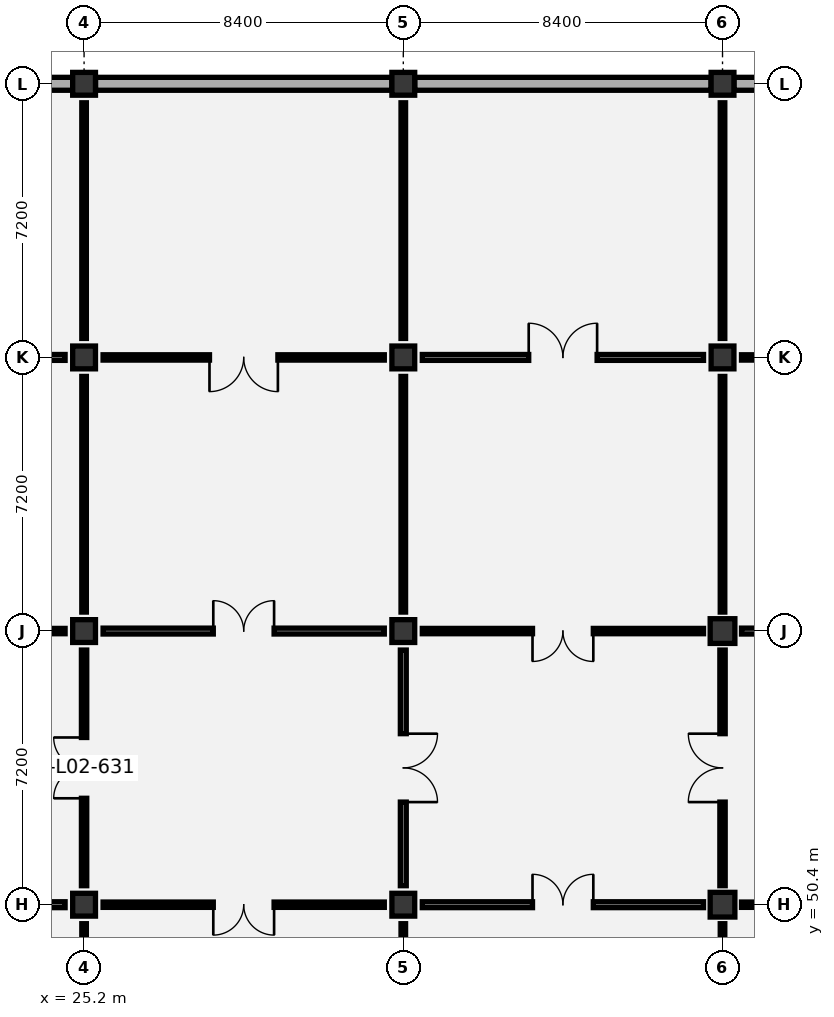
"""IFC4 building model, lengths in metres.
Left out: names, types, materials, properties, quantities, classifications, styles, units other than length and angle.
Written with IfcOpenShell. Run it as: python <this file> out.ifc"""

import sys

from ifc_helpers import new_model, si_unit, direction, frame, frame_2d, origin, origin_2d, place, context, subcontext, project, spatial, rectangle, extrude, element, fill, save


model = new_model("IFC4")
c1 = context("Model", 3, precision=1e-05, world=origin(), true_north=direction((0.0, 1.0)))
c2 = subcontext(c1, "Body", "Model", "MODEL_VIEW")
j1 = project(units=[si_unit("LENGTHUNIT", "METRE"), si_unit("PLANEANGLEUNIT", "RADIAN")], contexts=[c1])
p1 = place(None, origin())
s1 = spatial("IfcSite", under=j1, at=p1, CompositionType="ELEMENT")
p2 = place(p1, origin())
s2 = spatial("IfcBuilding", under=s1, at=p2, CompositionType="ELEMENT")
p3 = place(p2, frame((0.0, 0.0, 11.4)))
s3 = spatial("IfcBuildingStorey", under=s2, at=p3, CompositionType="ELEMENT", Elevation=11.4)
for number, where, z_axis, x_axis in (
    (1, (25.2, 50.4, 0.0), (0.0, 0.0, 1.0), (1.0, 0.0, 0.0)),
    (2, (25.2, 57.6, 0.0), (0.0, 0.0, 1.0), (1.0, 0.0, 0.0)),
    (3, (25.2, 64.8, 0.0), (0.0, 0.0, 1.0), (1.0, 0.0, 0.0)),
    (4, (25.2, 72.0, 0.0), (0.0, 0.0, 1.0), (1.0, 0.0, 0.0)),
    (5, (33.6, 50.4, 0.0), (0.0, 0.0, 1.0), (1.0, 0.0, 0.0)),
    (6, (33.6, 57.6, 0.0), (0.0, 0.0, 1.0), (1.0, 0.0, 0.0)),
    (7, (33.6, 64.8, 0.0), (0.0, 0.0, 1.0), (1.0, 0.0, 0.0)),
    (8, (33.6, 72.0, 0.0), (0.0, 0.0, 1.0), (1.0, 0.0, 0.0)),
):
    element("IfcColumn", number, at=place(p3, frame(where, z_axis=z_axis, x_axis=x_axis)), inside=s3, PredefinedType="COLUMN", context=c2, shape_type="SweptSolid", body=[
        extrude(rectangle(XDim=0.6, YDim=0.6, at=origin_2d()), origin(), (0.0, 0.0, 1.0), 5.4),
    ])
for number, where, z_axis, x_axis in (
    (9, (42.0, 50.4, 0.0), (0.0, 0.0, 1.0), (1.0, 0.0, 0.0)),
    (10, (42.0, 57.6, 0.0), (0.0, 0.0, 1.0), (1.0, 0.0, 0.0)),
):
    element("IfcColumn", number, at=place(p3, frame(where, z_axis=z_axis, x_axis=x_axis)), inside=s3, PredefinedType="COLUMN", context=c2, shape_type="SweptSolid", body=[
        extrude(rectangle(XDim=0.65, YDim=0.65, at=origin_2d()), origin(), (0.0, 0.0, 1.0), 5.4),
    ])
for number, where, z_axis, x_axis in (
    (11, (42.0, 64.8, 0.0), (0.0, 0.0, 1.0), (1.0, 0.0, 0.0)),
    (12, (42.0, 72.0, 0.0), (0.0, 0.0, 1.0), (1.0, 0.0, 0.0)),
):
    element("IfcColumn", number, at=place(p3, frame(where, z_axis=z_axis, x_axis=x_axis)), inside=s3, PredefinedType="COLUMN", context=c2, shape_type="SweptSolid", body=[
        extrude(rectangle(XDim=0.6, YDim=0.6, at=origin_2d()), origin(), (0.0, 0.0, 1.0), 5.4),
    ])
p4 = place(p3, frame((17.1, 72.0, 0.0), z_axis=(0.0, 0.0, 1.0), x_axis=(1.0, 0.0, 0.0)))
e13 = element("IfcWall", 13, at=p4, inside=s3, PredefinedType="SOLIDWALL", context=c2, shape_type="SweptSolid", body=[
    extrude(rectangle(XDim=7.8, YDim=0.34, at=frame_2d((3.9, 0.0))), origin(), (0.0, 0.0, 1.0), 4.445),
])
for number, where, z_axis, x_axis in (
    (14, (25.5, 72.0, 0.0), (0.0, 0.0, 1.0), (1.0, 0.0, 0.0)),
    (15, (33.9, 72.0, 0.0), (0.0, 0.0, 1.0), (1.0, 0.0, 0.0)),
    (16, (42.3, 72.0, 0.0), (0.0, 0.0, 1.0), (1.0, 0.0, 0.0)),
):
    element("IfcWall", number, at=place(p3, frame(where, z_axis=z_axis, x_axis=x_axis)), inside=s3, PredefinedType="SOLIDWALL", context=c2, shape_type="SweptSolid", body=[
        extrude(rectangle(XDim=7.8, YDim=0.34, at=frame_2d((3.9, 0.0))), origin(), (0.0, 0.0, 1.0), 4.445),
    ])
p5 = place(p3, frame((25.2, 43.7, 0.0), z_axis=(0.0, 0.0, 1.0), x_axis=(0.0, 1.0, 0.0)))
e17 = element("IfcWall", 17, at=p5, inside=s3, PredefinedType="PARTITIONING", context=c2, shape_type="SweptSolid", body=[
    extrude(rectangle(XDim=6.2, YDim=0.12, at=frame_2d((3.1, 0.0))), origin(), (0.0, 0.0, 1.0), 5.175),
])
p6 = place(p3, frame((17.3, 50.4, 0.0), z_axis=(0.0, 0.0, 1.0), x_axis=(1.0, 0.0, 0.0)))
e18 = element("IfcWall", 18, at=p6, inside=s3, PredefinedType="PARTITIONING", context=c2, shape_type="SweptSolid", body=[
    extrude(rectangle(XDim=7.4, YDim=0.155, at=frame_2d((3.7, 0.0))), origin(), (0.0, 0.0, 1.0), 5.175),
])
p7 = place(p6, frame((2.8, 0.0, 0.0)))
e19 = element("IfcOpeningElement", 19, at=p7, cuts=e18, PredefinedType="OPENING", context=c2, shape_type="SweptSolid", body=[
    extrude(rectangle(XDim=1.8, YDim=2.25, at=frame_2d((0.9, 1.125))), frame((0.0, 0.087, 0.0), z_axis=(0.0, -1.0, 0.0), x_axis=(1.0, 0.0, 0.0)), (0.0, 0.0, 1.0), 0.175),
])
p8 = place(p3, frame((25.2, 50.9, 0.0), z_axis=(0.0, 0.0, 1.0), x_axis=(0.0, 1.0, 0.0)))
e20 = element("IfcWall", 20, at=p8, inside=s3, PredefinedType="PARTITIONING", context=c2, shape_type="SweptSolid", body=[
    extrude(rectangle(XDim=6.2, YDim=0.14, at=frame_2d((3.1, 0.0))), origin(), (0.0, 0.0, 1.0), 5.175),
])
p9 = place(p8, frame((2.3, 0.0, 0.0)))
e21 = element("IfcOpeningElement", 21, at=p9, cuts=e20, PredefinedType="OPENING", context=c2, shape_type="SweptSolid", body=[
    extrude(rectangle(XDim=1.6, YDim=2.2, at=frame_2d((0.8, 1.1))), frame((0.0, 0.08, 0.0), z_axis=(0.0, -1.0, 0.0), x_axis=(1.0, 0.0, 0.0)), (0.0, 0.0, 1.0), 0.16),
])
p10 = place(p3, frame((17.3, 57.6, 0.0), z_axis=(0.0, 0.0, 1.0), x_axis=(1.0, 0.0, 0.0)))
e22 = element("IfcWall", 22, at=p10, inside=s3, PredefinedType="PARTITIONING", context=c2, shape_type="SweptSolid", body=[
    extrude(rectangle(XDim=7.4, YDim=0.14, at=frame_2d((3.7, 0.0))), origin(), (0.0, 0.0, 1.0), 4.445),
])
p11 = place(p10, frame((2.8, 0.0, 0.0)))
e23 = element("IfcOpeningElement", 23, at=p11, cuts=e22, PredefinedType="OPENING", context=c2, shape_type="SweptSolid", body=[
    extrude(rectangle(XDim=1.8, YDim=2.25, at=frame_2d((0.9, 1.125))), frame((0.0, 0.08, 0.0), z_axis=(0.0, -1.0, 0.0), x_axis=(1.0, 0.0, 0.0)), (0.0, 0.0, 1.0), 0.16),
])
p12 = place(p3, frame((25.2, 58.1, 0.0), z_axis=(0.0, 0.0, 1.0), x_axis=(0.0, 1.0, 0.0)))
e24 = element("IfcWall", 24, at=p12, inside=s3, PredefinedType="PARTITIONING", context=c2, shape_type="SweptSolid", body=[
    extrude(rectangle(XDim=6.2, YDim=0.12, at=frame_2d((3.1, 0.0))), origin(), (0.0, 0.0, 1.0), 4.395),
])
p13 = place(p3, frame((17.3, 64.8, 0.0), z_axis=(0.0, 0.0, 1.0), x_axis=(1.0, 0.0, 0.0)))
e25 = element("IfcWall", 25, at=p13, inside=s3, PredefinedType="PARTITIONING", context=c2, shape_type="SweptSolid", body=[
    extrude(rectangle(XDim=7.4, YDim=0.155, at=frame_2d((3.7, 0.0))), origin(), (0.0, 0.0, 1.0), 4.345),
])
p14 = place(p13, frame((2.9, 0.0, 0.0)))
e26 = element("IfcOpeningElement", 26, at=p14, cuts=e25, PredefinedType="OPENING", context=c2, shape_type="SweptSolid", body=[
    extrude(rectangle(XDim=1.6, YDim=2.2, at=frame_2d((0.8, 1.1))), frame((0.0, 0.087, 0.0), z_axis=(0.0, -1.0, 0.0), x_axis=(1.0, 0.0, 0.0)), (0.0, 0.0, 1.0), 0.175),
])
p15 = place(p3, frame((25.2, 65.3, 0.0), z_axis=(0.0, 0.0, 1.0), x_axis=(0.0, 1.0, 0.0)))
e27 = element("IfcWall", 27, at=p15, inside=s3, PredefinedType="PARTITIONING", context=c2, shape_type="SweptSolid", body=[
    extrude(rectangle(XDim=6.2, YDim=0.12, at=frame_2d((3.1, 0.0))), origin(), (0.0, 0.0, 1.0), 4.805),
])
p16 = place(p3, frame((33.6, 43.7, 0.0), z_axis=(0.0, 0.0, 1.0), x_axis=(0.0, 1.0, 0.0)))
e28 = element("IfcWall", 28, at=p16, inside=s3, PredefinedType="PARTITIONING", context=c2, shape_type="SweptSolid", body=[
    extrude(rectangle(XDim=6.2, YDim=0.12, at=frame_2d((3.1, 0.0))), origin(), (0.0, 0.0, 1.0), 5.175),
])
p17 = place(p3, frame((25.7, 50.4, 0.0), z_axis=(0.0, 0.0, 1.0), x_axis=(1.0, 0.0, 0.0)))
e29 = element("IfcWall", 29, at=p17, inside=s3, PredefinedType="PARTITIONING", context=c2, shape_type="SweptSolid", body=[
    extrude(rectangle(XDim=7.4, YDim=0.14, at=frame_2d((3.7, 0.0))), origin(), (0.0, 0.0, 1.0), 5.175),
])
p18 = place(p17, frame((2.9, 0.0, 0.0)))
e30 = element("IfcOpeningElement", 30, at=p18, cuts=e29, PredefinedType="OPENING", context=c2, shape_type="SweptSolid", body=[
    extrude(rectangle(XDim=1.6, YDim=2.2, at=frame_2d((0.8, 1.1))), frame((0.0, 0.08, 0.0), z_axis=(0.0, -1.0, 0.0), x_axis=(1.0, 0.0, 0.0)), (0.0, 0.0, 1.0), 0.16),
])
p19 = place(p3, frame((33.6, 50.9, 0.0), z_axis=(0.0, 0.0, 1.0), x_axis=(0.0, 1.0, 0.0)))
e31 = element("IfcWall", 31, at=p19, inside=s3, PredefinedType="PARTITIONING", context=c2, shape_type="SweptSolid", body=[
    extrude(rectangle(XDim=6.2, YDim=0.155, at=frame_2d((3.1, 0.0))), origin(), (0.0, 0.0, 1.0), 5.175),
])
p20 = place(p19, frame((2.2, 0.0, 0.0)))
e32 = element("IfcOpeningElement", 32, at=p20, cuts=e31, PredefinedType="OPENING", context=c2, shape_type="SweptSolid", body=[
    extrude(rectangle(XDim=1.8, YDim=2.25, at=frame_2d((0.9, 1.125))), frame((0.0, 0.087, 0.0), z_axis=(0.0, -1.0, 0.0), x_axis=(1.0, 0.0, 0.0)), (0.0, 0.0, 1.0), 0.175),
])
p21 = place(p3, frame((25.7, 57.6, 0.0), z_axis=(0.0, 0.0, 1.0), x_axis=(1.0, 0.0, 0.0)))
e33 = element("IfcWall", 33, at=p21, inside=s3, PredefinedType="PARTITIONING", context=c2, shape_type="SweptSolid", body=[
    extrude(rectangle(XDim=7.4, YDim=0.155, at=frame_2d((3.7, 0.0))), origin(), (0.0, 0.0, 1.0), 4.445),
])
p22 = place(p21, frame((2.9, 0.0, 0.0)))
e34 = element("IfcOpeningElement", 34, at=p22, cuts=e33, PredefinedType="OPENING", context=c2, shape_type="SweptSolid", body=[
    extrude(rectangle(XDim=1.6, YDim=2.2, at=frame_2d((0.8, 1.1))), frame((0.0, 0.087, 0.0), z_axis=(0.0, -1.0, 0.0), x_axis=(1.0, 0.0, 0.0)), (0.0, 0.0, 1.0), 0.175),
])
p23 = place(p3, frame((33.6, 58.1, 0.0), z_axis=(0.0, 0.0, 1.0), x_axis=(0.0, 1.0, 0.0)))
e35 = element("IfcWall", 35, at=p23, inside=s3, PredefinedType="PARTITIONING", context=c2, shape_type="SweptSolid", body=[
    extrude(rectangle(XDim=6.2, YDim=0.12, at=frame_2d((3.1, 0.0))), origin(), (0.0, 0.0, 1.0), 4.805),
])
p24 = place(p3, frame((25.7, 64.8, 0.0), z_axis=(0.0, 0.0, 1.0), x_axis=(1.0, 0.0, 0.0)))
e36 = element("IfcWall", 36, at=p24, inside=s3, PredefinedType="PARTITIONING", context=c2, shape_type="SweptSolid", body=[
    extrude(rectangle(XDim=7.4, YDim=0.14, at=frame_2d((3.7, 0.0))), origin(), (0.0, 0.0, 1.0), 4.345),
])
p25 = place(p24, frame((2.8, 0.0, 0.0)))
e37 = element("IfcOpeningElement", 37, at=p25, cuts=e36, PredefinedType="OPENING", context=c2, shape_type="SweptSolid", body=[
    extrude(rectangle(XDim=1.8, YDim=2.25, at=frame_2d((0.9, 1.125))), frame((0.0, 0.08, 0.0), z_axis=(0.0, -1.0, 0.0), x_axis=(1.0, 0.0, 0.0)), (0.0, 0.0, 1.0), 0.16),
])
p26 = place(p3, frame((33.6, 65.3, 0.0), z_axis=(0.0, 0.0, 1.0), x_axis=(0.0, 1.0, 0.0)))
e38 = element("IfcWall", 38, at=p26, inside=s3, PredefinedType="PARTITIONING", context=c2, shape_type="SweptSolid", body=[
    extrude(rectangle(XDim=6.2, YDim=0.12, at=frame_2d((3.1, 0.0))), origin(), (0.0, 0.0, 1.0), 4.395),
])
p27 = place(p3, frame((42.0, 43.7, 0.0), z_axis=(0.0, 0.0, 1.0), x_axis=(0.0, 1.0, 0.0)))
e39 = element("IfcWall", 39, at=p27, inside=s3, PredefinedType="PARTITIONING", context=c2, shape_type="SweptSolid", body=[
    extrude(rectangle(XDim=6.2, YDim=0.12, at=frame_2d((3.1, 0.0))), origin(), (0.0, 0.0, 1.0), 4.445),
])
p28 = place(p3, frame((34.1, 50.4, 0.0), z_axis=(0.0, 0.0, 1.0), x_axis=(1.0, 0.0, 0.0)))
e40 = element("IfcWall", 40, at=p28, inside=s3, PredefinedType="PARTITIONING", context=c2, shape_type="SweptSolid", body=[
    extrude(rectangle(XDim=7.4, YDim=0.155, at=frame_2d((3.7, 0.0))), origin(), (0.0, 0.0, 1.0), 5.175),
])
p29 = place(p28, frame((2.9, 0.0, 0.0)))
e41 = element("IfcOpeningElement", 41, at=p29, cuts=e40, PredefinedType="OPENING", context=c2, shape_type="SweptSolid", body=[
    extrude(rectangle(XDim=1.6, YDim=2.2, at=frame_2d((0.8, 1.1))), frame((0.0, 0.087, 0.0), z_axis=(0.0, -1.0, 0.0), x_axis=(1.0, 0.0, 0.0)), (0.0, 0.0, 1.0), 0.175),
])
p30 = place(p3, frame((42.0, 50.9, 0.0), z_axis=(0.0, 0.0, 1.0), x_axis=(0.0, 1.0, 0.0)))
e42 = element("IfcWall", 42, at=p30, inside=s3, PredefinedType="PARTITIONING", context=c2, shape_type="SweptSolid", body=[
    extrude(rectangle(XDim=6.2, YDim=0.14, at=frame_2d((3.1, 0.0))), origin(), (0.0, 0.0, 1.0), 4.445),
])
p31 = place(p30, frame((2.2, 0.0, 0.0)))
e43 = element("IfcOpeningElement", 43, at=p31, cuts=e42, PredefinedType="OPENING", context=c2, shape_type="SweptSolid", body=[
    extrude(rectangle(XDim=1.8, YDim=2.25, at=frame_2d((0.9, 1.125))), frame((0.0, 0.08, 0.0), z_axis=(0.0, -1.0, 0.0), x_axis=(1.0, 0.0, 0.0)), (0.0, 0.0, 1.0), 0.16),
])
p32 = place(p3, frame((34.1, 57.6, 0.0), z_axis=(0.0, 0.0, 1.0), x_axis=(1.0, 0.0, 0.0)))
e44 = element("IfcWall", 44, at=p32, inside=s3, PredefinedType="PARTITIONING", context=c2, shape_type="SweptSolid", body=[
    extrude(rectangle(XDim=7.4, YDim=0.14, at=frame_2d((3.7, 0.0))), origin(), (0.0, 0.0, 1.0), 4.445),
])
p33 = place(p32, frame((2.9, 0.0, 0.0)))
e45 = element("IfcOpeningElement", 45, at=p33, cuts=e44, PredefinedType="OPENING", context=c2, shape_type="SweptSolid", body=[
    extrude(rectangle(XDim=1.6, YDim=2.2, at=frame_2d((0.8, 1.1))), frame((0.0, 0.08, 0.0), z_axis=(0.0, -1.0, 0.0), x_axis=(1.0, 0.0, 0.0)), (0.0, 0.0, 1.0), 0.16),
])
p34 = place(p3, frame((42.0, 58.1, 0.0), z_axis=(0.0, 0.0, 1.0), x_axis=(0.0, 1.0, 0.0)))
e46 = element("IfcWall", 46, at=p34, inside=s3, PredefinedType="PARTITIONING", context=c2, shape_type="SweptSolid", body=[
    extrude(rectangle(XDim=6.2, YDim=0.12, at=frame_2d((3.1, 0.0))), origin(), (0.0, 0.0, 1.0), 4.395),
])
p35 = place(p3, frame((34.1, 64.8, 0.0), z_axis=(0.0, 0.0, 1.0), x_axis=(1.0, 0.0, 0.0)))
e47 = element("IfcWall", 47, at=p35, inside=s3, PredefinedType="PARTITIONING", context=c2, shape_type="SweptSolid", body=[
    extrude(rectangle(XDim=7.4, YDim=0.155, at=frame_2d((3.7, 0.0))), origin(), (0.0, 0.0, 1.0), 4.345),
])
p36 = place(p35, frame((2.8, 0.0, 0.0)))
e48 = element("IfcOpeningElement", 48, at=p36, cuts=e47, PredefinedType="OPENING", context=c2, shape_type="SweptSolid", body=[
    extrude(rectangle(XDim=1.8, YDim=2.25, at=frame_2d((0.9, 1.125))), frame((0.0, 0.087, 0.0), z_axis=(0.0, -1.0, 0.0), x_axis=(1.0, 0.0, 0.0)), (0.0, 0.0, 1.0), 0.175),
])
p37 = place(p3, frame((42.0, 65.3, 0.0), z_axis=(0.0, 0.0, 1.0), x_axis=(0.0, 1.0, 0.0)))
e49 = element("IfcWall", 49, at=p37, inside=s3, PredefinedType="PARTITIONING", context=c2, shape_type="SweptSolid", body=[
    extrude(rectangle(XDim=6.2, YDim=0.12, at=frame_2d((3.1, 0.0))), origin(), (0.0, 0.0, 1.0), 4.595),
])
p38 = place(p3, frame((42.5, 50.4, 0.0), z_axis=(0.0, 0.0, 1.0), x_axis=(1.0, 0.0, 0.0)))
e50 = element("IfcWall", 50, at=p38, inside=s3, PredefinedType="PARTITIONING", context=c2, shape_type="SweptSolid", body=[
    extrude(rectangle(XDim=7.4, YDim=0.14, at=frame_2d((3.7, 0.0))), origin(), (0.0, 0.0, 1.0), 4.345),
])
p39 = place(p38, frame((2.9, 0.0, 0.0)))
e51 = element("IfcOpeningElement", 51, at=p39, cuts=e50, PredefinedType="OPENING", context=c2, shape_type="SweptSolid", body=[
    extrude(rectangle(XDim=1.6, YDim=2.2, at=frame_2d((0.8, 1.1))), frame((0.0, 0.08, 0.0), z_axis=(0.0, -1.0, 0.0), x_axis=(1.0, 0.0, 0.0)), (0.0, 0.0, 1.0), 0.16),
])
p40 = place(p3, frame((42.5, 57.6, 0.0), z_axis=(0.0, 0.0, 1.0), x_axis=(1.0, 0.0, 0.0)))
e52 = element("IfcWall", 52, at=p40, inside=s3, PredefinedType="PARTITIONING", context=c2, shape_type="SweptSolid", body=[
    extrude(rectangle(XDim=7.4, YDim=0.155, at=frame_2d((3.7, 0.0))), origin(), (0.0, 0.0, 1.0), 4.345),
])
p41 = place(p40, frame((2.9, 0.0, 0.0)))
e53 = element("IfcOpeningElement", 53, at=p41, cuts=e52, PredefinedType="OPENING", context=c2, shape_type="SweptSolid", body=[
    extrude(rectangle(XDim=1.6, YDim=2.2, at=frame_2d((0.8, 1.1))), frame((0.0, 0.087, 0.0), z_axis=(0.0, -1.0, 0.0), x_axis=(1.0, 0.0, 0.0)), (0.0, 0.0, 1.0), 0.175),
])
p42 = place(p3, frame((42.5, 64.8, 0.0), z_axis=(0.0, 0.0, 1.0), x_axis=(1.0, 0.0, 0.0)))
e54 = element("IfcWall", 54, at=p42, inside=s3, PredefinedType="PARTITIONING", context=c2, shape_type="SweptSolid", body=[
    extrude(rectangle(XDim=7.4, YDim=0.14, at=frame_2d((3.7, 0.0))), origin(), (0.0, 0.0, 1.0), 4.345),
])
p43 = place(p42, frame((2.8, 0.0, 0.0)))
e55 = element("IfcOpeningElement", 55, at=p43, cuts=e54, PredefinedType="OPENING", context=c2, shape_type="SweptSolid", body=[
    extrude(rectangle(XDim=1.8, YDim=2.25, at=frame_2d((0.9, 1.125))), frame((0.0, 0.08, 0.0), z_axis=(0.0, -1.0, 0.0), x_axis=(1.0, 0.0, 0.0)), (0.0, 0.0, 1.0), 0.16),
])
p44 = place(p9, origin())
e56 = element("IfcDoor", 56, at=p44, inside=s3, OperationType="DOUBLE_DOOR_SINGLE_SWING", PredefinedType="DOOR", context=c2, shape_type="SweptSolid", body=[
    extrude(rectangle(XDim=1.6, YDim=2.2, at=frame_2d((0.8, 1.1))), frame((0.0, 0.025, 0.0), z_axis=(0.0, -1.0, 0.0), x_axis=(1.0, 0.0, 0.0)), (0.0, 0.0, 1.0), 0.05),
])
fill(e21, e56)
p45 = place(p18, frame((1.6, 0.0, 0.0), z_axis=(0.0, 0.0, 1.0), x_axis=(-1.0, 0.0, 0.0)))
e57 = element("IfcDoor", 57, at=p45, inside=s3, OperationType="DOUBLE_DOOR_SINGLE_SWING", PredefinedType="DOOR", context=c2, shape_type="SweptSolid", body=[
    extrude(rectangle(XDim=1.6, YDim=2.2, at=frame_2d((0.8, 1.1))), frame((0.0, 0.025, 0.0), z_axis=(0.0, -1.0, 0.0), x_axis=(1.0, 0.0, 0.0)), (0.0, 0.0, 1.0), 0.05),
])
fill(e30, e57)
p46 = place(p20, frame((1.8, 0.0, 0.0), z_axis=(0.0, 0.0, 1.0), x_axis=(-1.0, 0.0, 0.0)))
e58 = element("IfcDoor", 58, at=p46, inside=s3, OperationType="DOUBLE_DOOR_SINGLE_SWING", PredefinedType="DOOR", context=c2, shape_type="SweptSolid", body=[
    extrude(rectangle(XDim=1.8, YDim=2.25, at=frame_2d((0.9, 1.125))), frame((0.0, 0.025, 0.0), z_axis=(0.0, -1.0, 0.0), x_axis=(1.0, 0.0, 0.0)), (0.0, 0.0, 1.0), 0.05),
])
fill(e32, e58)
p47 = place(p22, origin())
e59 = element("IfcDoor", 59, at=p47, inside=s3, OperationType="DOUBLE_DOOR_SINGLE_SWING", PredefinedType="DOOR", context=c2, shape_type="SweptSolid", body=[
    extrude(rectangle(XDim=1.6, YDim=2.2, at=frame_2d((0.8, 1.1))), frame((0.0, 0.025, 0.0), z_axis=(0.0, -1.0, 0.0), x_axis=(1.0, 0.0, 0.0)), (0.0, 0.0, 1.0), 0.05),
])
fill(e34, e59)
p48 = place(p25, frame((1.8, 0.0, 0.0), z_axis=(0.0, 0.0, 1.0), x_axis=(-1.0, 0.0, 0.0)))
e60 = element("IfcDoor", 60, at=p48, inside=s3, OperationType="DOUBLE_DOOR_SINGLE_SWING", PredefinedType="DOOR", context=c2, shape_type="SweptSolid", body=[
    extrude(rectangle(XDim=1.8, YDim=2.25, at=frame_2d((0.9, 1.125))), frame((0.0, 0.025, 0.0), z_axis=(0.0, -1.0, 0.0), x_axis=(1.0, 0.0, 0.0)), (0.0, 0.0, 1.0), 0.05),
])
fill(e37, e60)
p49 = place(p29, origin())
e61 = element("IfcDoor", 61, at=p49, inside=s3, OperationType="DOUBLE_DOOR_SINGLE_SWING", PredefinedType="DOOR", context=c2, shape_type="SweptSolid", body=[
    extrude(rectangle(XDim=1.6, YDim=2.2, at=frame_2d((0.8, 1.1))), frame((0.0, 0.025, 0.0), z_axis=(0.0, -1.0, 0.0), x_axis=(1.0, 0.0, 0.0)), (0.0, 0.0, 1.0), 0.05),
])
fill(e41, e61)
p50 = place(p31, origin())
e62 = element("IfcDoor", 62, at=p50, inside=s3, OperationType="DOUBLE_DOOR_SINGLE_SWING", PredefinedType="DOOR", context=c2, shape_type="SweptSolid", body=[
    extrude(rectangle(XDim=1.8, YDim=2.25, at=frame_2d((0.9, 1.125))), frame((0.0, 0.025, 0.0), z_axis=(0.0, -1.0, 0.0), x_axis=(1.0, 0.0, 0.0)), (0.0, 0.0, 1.0), 0.05),
])
fill(e43, e62)
p51 = place(p33, frame((1.6, 0.0, 0.0), z_axis=(0.0, 0.0, 1.0), x_axis=(-1.0, 0.0, 0.0)))
e63 = element("IfcDoor", 63, at=p51, inside=s3, OperationType="DOUBLE_DOOR_SINGLE_SWING", PredefinedType="DOOR", context=c2, shape_type="SweptSolid", body=[
    extrude(rectangle(XDim=1.6, YDim=2.2, at=frame_2d((0.8, 1.1))), frame((0.0, 0.025, 0.0), z_axis=(0.0, -1.0, 0.0), x_axis=(1.0, 0.0, 0.0)), (0.0, 0.0, 1.0), 0.05),
])
fill(e45, e63)
p52 = place(p36, origin())
e64 = element("IfcDoor", 64, at=p52, inside=s3, OperationType="DOUBLE_DOOR_SINGLE_SWING", PredefinedType="DOOR", context=c2, shape_type="SweptSolid", body=[
    extrude(rectangle(XDim=1.8, YDim=2.25, at=frame_2d((0.9, 1.125))), frame((0.0, 0.025, 0.0), z_axis=(0.0, -1.0, 0.0), x_axis=(1.0, 0.0, 0.0)), (0.0, 0.0, 1.0), 0.05),
])
fill(e48, e64)
save(model, sys.argv[1])
